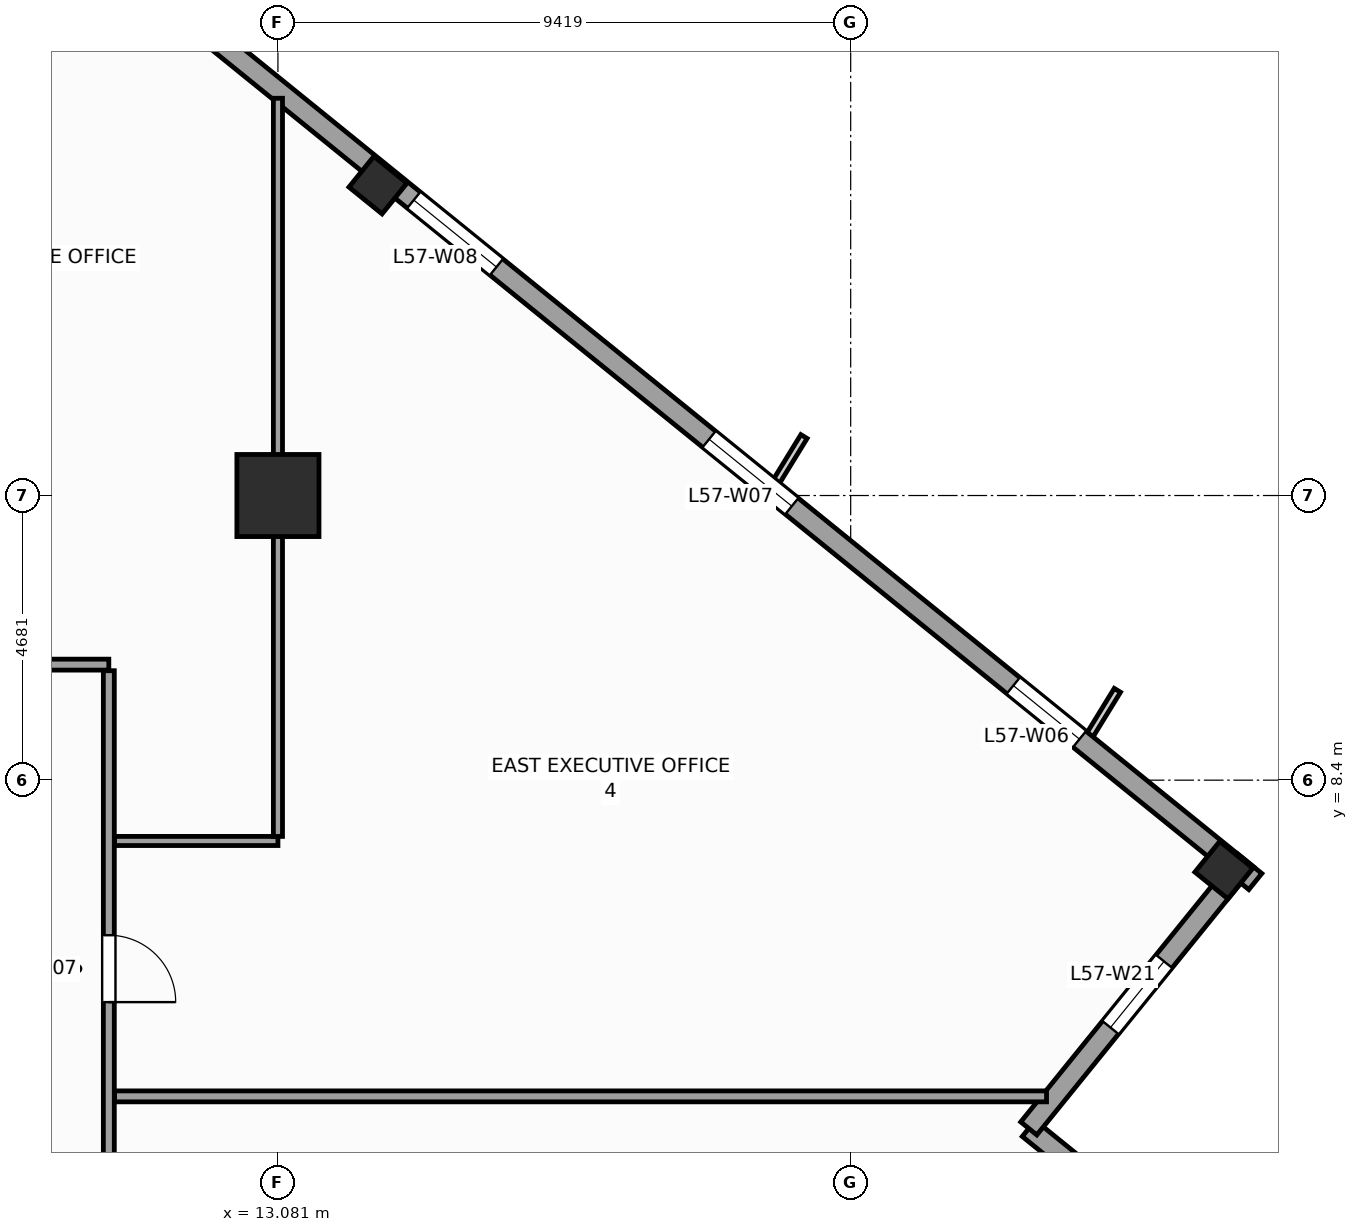
"""IFC4 building model, lengths in metres.
Left out: names, types, materials, properties, quantities, classifications, styles, units other than length and angle.
Written with IfcOpenShell. Run it as: python <this file> out.ifc"""

import sys

from ifc_helpers import new_model, si_unit, direction, frame, frame_2d, origin, origin_2d, place, context, subcontext, project, spatial, rectangle, extrude, source, transform, mapped, element, fill, save


model = new_model("IFC4")
c1 = context("Model", 3, precision=1e-05, world=origin(), true_north=direction((0.0, 1.0)))
c2 = subcontext(c1, "Body", "Model", "MODEL_VIEW")
j1 = project(units=[si_unit("LENGTHUNIT", "METRE"), si_unit("PLANEANGLEUNIT", "RADIAN")], contexts=[c1])
p1 = place(None, origin())
s1 = spatial("IfcSite", under=j1, at=p1, CompositionType="ELEMENT")
p2 = place(p1, origin())
s2 = spatial("IfcBuilding", under=s1, at=p2, CompositionType="ELEMENT")
p3 = place(p2, frame((0.0, 0.0, 236.8)))
s3 = spatial("IfcBuildingStorey", under=s2, at=p3, CompositionType="ELEMENT", Elevation=236.8)
m1 = source(origin(), c2, "Body", "SweptSolid", [
    extrude(rectangle(XDim=1.35, YDim=1.35, at=origin_2d()), origin(), (0.0, 0.0, 1.0), 3.9),
])
p4 = place(p3, frame((13.081, 13.081, 0.0), z_axis=(0.0, 0.0, 1.0), x_axis=(1.0, 0.0, 0.0)))
e1 = element("IfcColumn", 1, at=p4, inside=s3, PredefinedType="COLUMN", context=c2, shape_type="MappedRepresentation", body=[
    mapped(m1, transform((0.0, 0.0, 0.0), scale=1.0)),
])
m2 = source(origin(), c2, "Body", "SweptSolid", [
    extrude(rectangle(XDim=0.65, YDim=0.7, at=origin_2d()), origin(), (0.0, 0.0, 1.0), 3.9),
])
for number, where, z_axis, x_axis in (
    (2, (28.637, 6.92, 0.0), (0.0, 0.0, 1.0), (0.629, 0.777, 0.0)),
    (3, (14.726, 18.185, 0.0), (0.0, 0.0, 1.0), (0.629, 0.777, 0.0)),
):
    element("IfcColumn", number, at=place(p3, frame(where, z_axis=z_axis, x_axis=x_axis)), inside=s3, PredefinedType="COLUMN", context=c2, shape_type="MappedRepresentation", body=[
        mapped(m2, transform((0.0, 0.0, 0.0), scale=1.0)),
    ])
p5 = place(p3, frame((29.703, -0.789, 0.0), z_axis=(0.0, 0.0, 1.0), x_axis=(-0.77714355312, 0.629323365087, 0.0)))
e4 = element("IfcWall", 4, at=p5, inside=s3, PredefinedType="STANDARD", context=c2, shape_type="SweptSolid", body=[
    extrude(rectangle(XDim=5.5, YDim=0.34, at=frame_2d((2.75, 0.0))), origin(), (0.0, 0.0, 1.0), 3.66),
])
p6 = place(p3, frame((25.429, 2.673, 0.0), z_axis=(0.0, 0.0, 1.0), x_axis=(0.629299794138, 0.777162640055, 0.0)))
e5 = element("IfcWall", 5, at=p6, inside=s3, PredefinedType="STANDARD", context=c2, shape_type="SweptSolid", body=[
    extrude(rectangle(XDim=5.67, YDim=0.34, at=frame_2d((2.835, 0.0))), origin(), (0.0, 0.0, 1.0), 3.66),
])
p7 = place(p6, frame((2.135, 0.0, 0.48)))
e6 = element("IfcOpeningElement", 6, at=p7, cuts=e5, PredefinedType="OPENING", context=c2, shape_type="SweptSolid", body=[
    extrude(rectangle(XDim=1.4, YDim=2.4, at=frame_2d((0.7, 1.2))), frame((0.0, 0.18, 0.0), z_axis=(0.0, -1.0, 0.0), x_axis=(1.0, 0.0, 0.0)), (0.0, 0.0, 1.0), 0.36),
])
p8 = place(p3, frame((29.154, 6.733, 0.0), z_axis=(0.0, 0.0, 1.0), x_axis=(-0.77714192302, 0.629325378072, 0.0)))
e7 = element("IfcWall", 7, at=p8, inside=s3, PredefinedType="STANDARD", context=c2, shape_type="SweptSolid", body=[
    extrude(rectangle(XDim=36.84, YDim=0.34, at=frame_2d((18.42, 0.0))), origin(), (0.0, 0.0, 1.0), 2.96),
])
p9 = place(p8, frame((3.721, 0.0, 0.48)))
e8 = element("IfcOpeningElement", 8, at=p9, cuts=e7, PredefinedType="OPENING", context=c2, shape_type="SweptSolid", body=[
    extrude(rectangle(XDim=1.4, YDim=2.4, at=frame_2d((0.7, 1.2))), frame((0.0, 0.18, 0.0), z_axis=(0.0, -1.0, 0.0), x_axis=(1.0, 0.0, 0.0)), (0.0, 0.0, 1.0), 0.36),
])
p10 = place(p8, frame((9.809, 0.0, 0.58)))
e9 = element("IfcOpeningElement", 9, at=p10, cuts=e7, PredefinedType="OPENING", context=c2, shape_type="SweptSolid", body=[
    extrude(rectangle(XDim=1.75, YDim=2.3, at=frame_2d((0.875, 1.15))), frame((0.0, 0.18, 0.0), z_axis=(0.0, -1.0, 0.0), x_axis=(1.0, 0.0, 0.0)), (0.0, 0.0, 1.0), 0.36),
])
p11 = place(p8, frame((16.058, 0.0, 0.58)))
e10 = element("IfcOpeningElement", 10, at=p11, cuts=e7, PredefinedType="OPENING", context=c2, shape_type="SweptSolid", body=[
    extrude(rectangle(XDim=1.75, YDim=2.3, at=frame_2d((0.875, 1.15))), frame((0.0, 0.18, 0.0), z_axis=(0.0, -1.0, 0.0), x_axis=(1.0, 0.0, 0.0)), (0.0, 0.0, 1.0), 0.36),
])
p12 = place(p8, frame((24.176, 0.0, 0.58)))
e11 = element("IfcOpeningElement", 11, at=p12, cuts=e7, PredefinedType="OPENING", context=c2, shape_type="SweptSolid", body=[
    extrude(rectangle(XDim=1.75, YDim=2.3, at=frame_2d((0.875, 1.15))), frame((0.0, 0.18, 0.0), z_axis=(0.0, -1.0, 0.0), x_axis=(1.0, 0.0, 0.0)), (0.0, 0.0, 1.0), 0.36),
])
p13 = place(p8, frame((32.482, 0.0, 0.48)))
e12 = element("IfcOpeningElement", 12, at=p13, cuts=e7, PredefinedType="OPENING", context=c2, shape_type="SweptSolid", body=[
    extrude(rectangle(XDim=1.4, YDim=2.4, at=frame_2d((0.7, 1.2))), frame((0.0, 0.18, 0.0), z_axis=(0.0, -1.0, 0.0), x_axis=(1.0, 0.0, 0.0)), (0.0, 0.0, 1.0), 0.36),
])
p14 = place(p3, frame((-11.4, 10.3, 0.0), z_axis=(0.0, 0.0, 1.0), x_axis=(1.0, 0.0, 0.0)))
e13 = element("IfcWall", 13, at=p14, inside=s3, PredefinedType="PARTITIONING", context=c2, shape_type="SweptSolid", body=[
    extrude(rectangle(XDim=21.7, YDim=0.18, at=frame_2d((10.85, 0.0))), origin(), (0.0, 0.0, 1.0), 3.66),
])
p15 = place(p14, frame((10.925, 0.0, 0.0)))
e14 = element("IfcOpeningElement", 14, at=p15, cuts=e13, PredefinedType="OPENING", context=c2, shape_type="SweptSolid", body=[
    extrude(rectangle(XDim=0.95, YDim=2.1, at=frame_2d((0.475, 1.05))), frame((0.0, 0.1, 0.0), z_axis=(0.0, -1.0, 0.0), x_axis=(1.0, 0.0, 0.0)), (0.0, 0.0, 1.0), 0.2),
])
p16 = place(p14, frame((3.724, 0.0, 0.0)))
e15 = element("IfcOpeningElement", 15, at=p16, cuts=e13, PredefinedType="OPENING", context=c2, shape_type="SweptSolid", body=[
    extrude(rectangle(XDim=1.1, YDim=2.2, at=frame_2d((0.55, 1.1))), frame((0.0, 0.1, 0.0), z_axis=(0.0, -1.0, 0.0), x_axis=(1.0, 0.0, 0.0)), (0.0, 0.0, 1.0), 0.2),
])
p17 = place(p14, frame((8.326, 0.0, 0.0)))
e16 = element("IfcOpeningElement", 16, at=p17, cuts=e13, PredefinedType="OPENING", context=c2, shape_type="SweptSolid", body=[
    extrude(rectangle(XDim=1.1, YDim=2.2, at=frame_2d((0.55, 1.1))), frame((0.0, 0.1, 0.0), z_axis=(0.0, -1.0, 0.0), x_axis=(1.0, 0.0, 0.0)), (0.0, 0.0, 1.0), 0.2),
])
p18 = place(p14, frame((18.085, 0.0, 0.0)))
e17 = element("IfcOpeningElement", 17, at=p18, cuts=e13, PredefinedType="OPENING", context=c2, shape_type="SweptSolid", body=[
    extrude(rectangle(XDim=1.1, YDim=2.2, at=frame_2d((0.55, 1.1))), frame((0.0, 0.1, 0.0), z_axis=(0.0, -1.0, 0.0), x_axis=(1.0, 0.0, 0.0)), (0.0, 0.0, 1.0), 0.2),
])
p19 = place(p3, frame((10.3, -10.2, 0.0), z_axis=(0.0, 0.0, 1.0), x_axis=(0.0, 1.0, 0.0)))
e18 = element("IfcWall", 18, at=p19, inside=s3, PredefinedType="PARTITIONING", context=c2, shape_type="SweptSolid", body=[
    extrude(rectangle(XDim=20.4, YDim=0.18, at=frame_2d((10.2, 0.0))), origin(), (0.0, 0.0, 1.0), 3.66),
])
p20 = place(p19, frame((14.95, 0.0, 0.0)))
e19 = element("IfcOpeningElement", 19, at=p20, cuts=e18, PredefinedType="OPENING", context=c2, shape_type="SweptSolid", body=[
    extrude(rectangle(XDim=1.1, YDim=2.2, at=frame_2d((0.55, 1.1))), frame((0.0, 0.1, 0.0), z_axis=(0.0, -1.0, 0.0), x_axis=(1.0, 0.0, 0.0)), (0.0, 0.0, 1.0), 0.2),
])
p21 = place(p19, frame((9.65, 0.0, 0.0)))
e20 = element("IfcOpeningElement", 20, at=p21, cuts=e18, PredefinedType="OPENING", context=c2, shape_type="SweptSolid", body=[
    extrude(rectangle(XDim=1.1, YDim=2.2, at=frame_2d((0.55, 1.1))), frame((0.0, 0.1, 0.0), z_axis=(0.0, -1.0, 0.0), x_axis=(1.0, 0.0, 0.0)), (0.0, 0.0, 1.0), 0.2),
])
p22 = place(p19, frame((4.35, 0.0, 0.0)))
e21 = element("IfcOpeningElement", 21, at=p22, cuts=e18, PredefinedType="OPENING", context=c2, shape_type="SweptSolid", body=[
    extrude(rectangle(XDim=1.1, YDim=2.2, at=frame_2d((0.55, 1.1))), frame((0.0, 0.1, 0.0), z_axis=(0.0, -1.0, 0.0), x_axis=(1.0, 0.0, 0.0)), (0.0, 0.0, 1.0), 0.2),
])
p23 = place(p3, frame((10.395, 3.2, 0.0), z_axis=(0.0, 0.0, 1.0), x_axis=(1.0, 0.0, 0.0)))
e22 = element("IfcWall", 22, at=p23, inside=s3, PredefinedType="PARTITIONING", context=c2, shape_type="SweptSolid", body=[
    extrude(rectangle(XDim=15.326, YDim=0.18, at=frame_2d((7.663, 0.0))), origin(), (0.0, 0.0, 1.0), 3.66),
])
p24 = place(p3, frame((10.395, 7.4, 0.0), z_axis=(0.0, 0.0, 1.0), x_axis=(1.0, 0.0, 0.0)))
e23 = element("IfcWall", 23, at=p24, inside=s3, PredefinedType="PARTITIONING", context=c2, shape_type="SweptSolid", body=[
    extrude(rectangle(XDim=2.686, YDim=0.15, at=frame_2d((1.343, 0.0))), origin(), (0.0, 0.0, 1.0), 3.66),
])
p25 = place(p3, frame((13.081, 7.475, 0.0), z_axis=(0.0, 0.0, 1.0), x_axis=(0.0, 1.0, 0.0)))
e24 = element("IfcWall", 24, at=p25, inside=s3, PredefinedType="PARTITIONING", context=c2, shape_type="SweptSolid", body=[
    extrude(rectangle(XDim=12.139, YDim=0.15, at=frame_2d((6.069, 0.0))), origin(), (0.0, 0.0, 1.0), 2.76),
])
m3 = source(origin(), c2, "Body", "SweptSolid", [
    extrude(rectangle(XDim=1.4, YDim=2.4, at=frame_2d((0.7, 1.2))), frame((0.0, 0.03, 0.0), z_axis=(0.0, -1.0, 0.0), x_axis=(1.0, 0.0, 0.0)), (0.0, 0.0, 1.0), 0.06),
])
p26 = place(p9, origin())
e25 = element("IfcWindow", 25, at=p26, inside=s3, PartitioningType="SINGLE_PANEL", PredefinedType="WINDOW", context=c2, shape_type="MappedRepresentation", body=[
    mapped(m3, transform((0.0, 0.0, 0.0), scale=1.0)),
])
fill(e8, e25)
m4 = source(origin(), c2, "Body", "SweptSolid", [
    extrude(rectangle(XDim=1.75, YDim=2.3, at=frame_2d((0.875, 1.15))), frame((0.0, 0.03, 0.0), z_axis=(0.0, -1.0, 0.0), x_axis=(1.0, 0.0, 0.0)), (0.0, 0.0, 1.0), 0.06),
])
p27 = place(p10, origin())
e26 = element("IfcWindow", 26, at=p27, inside=s3, PartitioningType="SINGLE_PANEL", PredefinedType="WINDOW", context=c2, shape_type="MappedRepresentation", body=[
    mapped(m4, transform((0.0, 0.0, 0.0), scale=1.0)),
])
fill(e9, e26)
p28 = place(p11, origin())
e27 = element("IfcWindow", 27, at=p28, inside=s3, PartitioningType="SINGLE_PANEL", PredefinedType="WINDOW", context=c2, shape_type="MappedRepresentation", body=[
    mapped(m4, transform((0.0, 0.0, 0.0), scale=1.0)),
])
fill(e10, e27)
p29 = place(p7, origin())
e28 = element("IfcWindow", 28, at=p29, inside=s3, PartitioningType="SINGLE_PANEL", PredefinedType="WINDOW", context=c2, shape_type="MappedRepresentation", body=[
    mapped(m3, transform((0.0, 0.0, 0.0), scale=1.0)),
])
fill(e6, e28)
m5 = source(origin(), c2, "Body", "SweptSolid", [
    extrude(rectangle(XDim=1.1, YDim=2.2, at=frame_2d((0.55, 1.1))), frame((0.0, 0.025, 0.0), z_axis=(0.0, -1.0, 0.0), x_axis=(1.0, 0.0, 0.0)), (0.0, 0.0, 1.0), 0.05),
])
p30 = place(p20, frame((1.1, 0.0, 0.0), z_axis=(0.0, 0.0, 1.0), x_axis=(-1.0, 0.0, 0.0)))
e29 = element("IfcDoor", 29, at=p30, inside=s3, OperationType="SINGLE_SWING_LEFT", PredefinedType="DOOR", context=c2, shape_type="MappedRepresentation", body=[
    mapped(m5, transform((0.0, 0.0, 0.0), scale=1.0)),
])
fill(e19, e29)
save(model, sys.argv[1])
